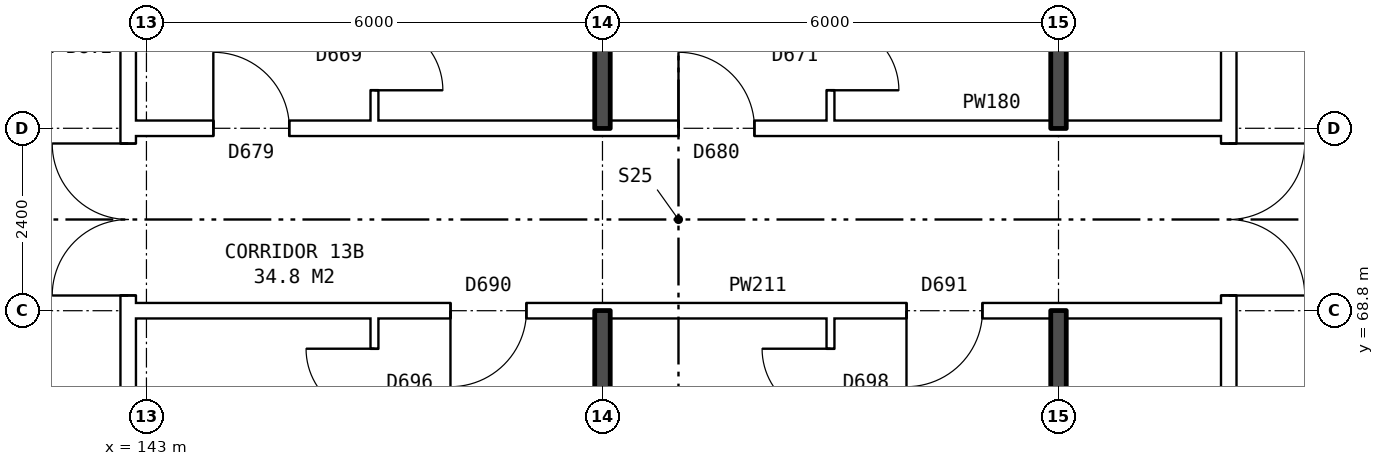
"""IFC4 building model, lengths in metres.
Left out: names, types, materials, properties, quantities, classifications, styles, units other than length and angle.
Written with IfcOpenShell. Run it as: python <this file> out.ifc"""

import sys

from ifc_helpers import new_model, si_unit, direction, frame, frame_2d, origin, place, context, subcontext, project, spatial, rectangle, extrude, element, fill, save


model = new_model("IFC4")
c1 = context("Model", 3, precision=1e-05, world=origin(), true_north=direction((0.0, 1.0)))
c2 = subcontext(c1, "Body", "Model", "MODEL_VIEW")
j1 = project(units=[si_unit("LENGTHUNIT", "METRE"), si_unit("PLANEANGLEUNIT", "RADIAN")], contexts=[c1])
p1 = place(None, origin())
s1 = spatial("IfcSite", under=j1, at=p1, CompositionType="ELEMENT")
p2 = place(p1, origin())
s2 = spatial("IfcBuilding", under=s1, at=p2, CompositionType="ELEMENT")
p3 = place(p2, frame((0.0, 0.0, 50.5)))
s3 = spatial("IfcBuildingStorey", under=s2, at=p3, CompositionType="ELEMENT", Elevation=50.5)
p4 = place(p3, frame((142.76, 63.9, 0.0), z_axis=(0.0, 0.0, 1.0), x_axis=(0.0, 1.0, 0.0)))
e1 = element("IfcWall", 1, at=p4, inside=s3, PredefinedType="PARTITIONING", context=c2, shape_type="SweptSolid", body=[
    extrude(rectangle(XDim=12.2, YDim=0.2, at=frame_2d((6.1, 0.0))), origin(), (0.0, 0.0, 1.0), 2.85),
])
p5 = place(p4, frame((5.1, 0.0, 0.0)))
e2 = element("IfcOpeningElement", 2, at=p5, cuts=e1, PredefinedType="OPENING", context=c2, shape_type="SweptSolid", body=[
    extrude(rectangle(XDim=2.0, YDim=2.1, at=frame_2d((1.0, 1.05))), frame((0.0, 0.11, 0.0), z_axis=(0.0, -1.0, 0.0), x_axis=(1.0, 0.0, 0.0)), (0.0, 0.0, 1.0), 0.22),
])
p6 = place(p3, frame((157.24, 63.9, 0.0), z_axis=(0.0, 0.0, 1.0), x_axis=(0.0, 1.0, 0.0)))
e3 = element("IfcWall", 3, at=p6, inside=s3, PredefinedType="PARTITIONING", context=c2, shape_type="SweptSolid", body=[
    extrude(rectangle(XDim=12.2, YDim=0.2, at=frame_2d((6.1, 0.0))), origin(), (0.0, 0.0, 1.0), 2.85),
])
p7 = place(p6, frame((5.1, 0.0, 0.0)))
e4 = element("IfcOpeningElement", 4, at=p7, cuts=e3, PredefinedType="OPENING", context=c2, shape_type="SweptSolid", body=[
    extrude(rectangle(XDim=2.0, YDim=2.1, at=frame_2d((1.0, 1.05))), frame((0.0, 0.11, 0.0), z_axis=(0.0, -1.0, 0.0), x_axis=(1.0, 0.0, 0.0)), (0.0, 0.0, 1.0), 0.22),
])
p8 = place(p3, frame((142.76, 68.8, 0.0), z_axis=(0.0, 0.0, 1.0), x_axis=(1.0, 0.0, 0.0)))
e5 = element("IfcWall", 5, at=p8, inside=s3, PredefinedType="PARTITIONING", context=c2, shape_type="SweptSolid", body=[
    extrude(rectangle(XDim=14.48, YDim=0.2, at=frame_2d((7.24, 0.0))), origin(), (0.0, 0.0, 1.0), 2.85),
])
p9 = place(p8, frame((4.24, 0.0, 0.0)))
e6 = element("IfcOpeningElement", 6, at=p9, cuts=e5, PredefinedType="OPENING", context=c2, shape_type="SweptSolid", body=[
    extrude(rectangle(XDim=1.0, YDim=2.1, at=frame_2d((0.5, 1.05))), frame((0.0, 0.11, 0.0), z_axis=(0.0, -1.0, 0.0), x_axis=(1.0, 0.0, 0.0)), (0.0, 0.0, 1.0), 0.22),
])
p10 = place(p8, frame((10.24, 0.0, 0.0)))
e7 = element("IfcOpeningElement", 7, at=p10, cuts=e5, PredefinedType="OPENING", context=c2, shape_type="SweptSolid", body=[
    extrude(rectangle(XDim=1.0, YDim=2.1, at=frame_2d((0.5, 1.05))), frame((0.0, 0.11, 0.0), z_axis=(0.0, -1.0, 0.0), x_axis=(1.0, 0.0, 0.0)), (0.0, 0.0, 1.0), 0.22),
])
p11 = place(p3, frame((142.76, 71.2, 0.0), z_axis=(0.0, 0.0, 1.0), x_axis=(1.0, 0.0, 0.0)))
e8 = element("IfcWall", 8, at=p11, inside=s3, PredefinedType="PARTITIONING", context=c2, shape_type="SweptSolid", body=[
    extrude(rectangle(XDim=14.48, YDim=0.2, at=frame_2d((7.24, 0.0))), origin(), (0.0, 0.0, 1.0), 2.85),
])
p12 = place(p11, frame((1.12, 0.0, 0.0)))
e9 = element("IfcOpeningElement", 9, at=p12, cuts=e8, PredefinedType="OPENING", context=c2, shape_type="SweptSolid", body=[
    extrude(rectangle(XDim=1.0, YDim=2.1, at=frame_2d((0.5, 1.05))), frame((0.0, 0.11, 0.0), z_axis=(0.0, -1.0, 0.0), x_axis=(1.0, 0.0, 0.0)), (0.0, 0.0, 1.0), 0.22),
])
p13 = place(p11, frame((7.24, 0.0, 0.0)))
e10 = element("IfcOpeningElement", 10, at=p13, cuts=e8, PredefinedType="OPENING", context=c2, shape_type="SweptSolid", body=[
    extrude(rectangle(XDim=1.0, YDim=2.1, at=frame_2d((0.5, 1.05))), frame((0.0, 0.11, 0.0), z_axis=(0.0, -1.0, 0.0), x_axis=(1.0, 0.0, 0.0)), (0.0, 0.0, 1.0), 0.22),
])
p14 = place(p3, frame((146.0, 54.36, 0.0), z_axis=(0.0, 0.0, 1.0), x_axis=(0.0, 1.0, 0.0)))
e11 = element("IfcWall", 11, at=p14, inside=s3, PredefinedType="PARTITIONING", context=c2, shape_type="SweptSolid", body=[
    extrude(rectangle(XDim=14.34, YDim=0.1, at=frame_2d((7.17, 0.0))), origin(), (0.0, 0.0, 1.0), 2.85),
])
p15 = place(p14, frame((5.5, 0.0, 0.0)))
e12 = element("IfcOpeningElement", 12, at=p15, cuts=e11, PredefinedType="OPENING", context=c2, shape_type="SweptSolid", body=[
    extrude(rectangle(XDim=0.9, YDim=2.1, at=frame_2d((0.45, 1.05))), frame((0.0, 0.06, 0.0), z_axis=(0.0, -1.0, 0.0), x_axis=(1.0, 0.0, 0.0)), (0.0, 0.0, 1.0), 0.12),
])
p16 = place(p14, frame((13.04, 0.0, 0.0)))
e13 = element("IfcOpeningElement", 13, at=p16, cuts=e11, PredefinedType="OPENING", context=c2, shape_type="SweptSolid", body=[
    extrude(rectangle(XDim=0.9, YDim=2.1, at=frame_2d((0.45, 1.05))), frame((0.0, 0.06, 0.0), z_axis=(0.0, -1.0, 0.0), x_axis=(1.0, 0.0, 0.0)), (0.0, 0.0, 1.0), 0.12),
])
p17 = place(p3, frame((146.0, 71.3, 0.0), z_axis=(0.0, 0.0, 1.0), x_axis=(0.0, 1.0, 0.0)))
e14 = element("IfcWall", 14, at=p17, inside=s3, PredefinedType="PARTITIONING", context=c2, shape_type="SweptSolid", body=[
    extrude(rectangle(XDim=14.34, YDim=0.1, at=frame_2d((7.17, 0.0))), origin(), (0.0, 0.0, 1.0), 2.85),
])
p18 = place(p17, frame((7.94, 0.0, 0.0)))
e15 = element("IfcOpeningElement", 15, at=p18, cuts=e14, PredefinedType="OPENING", context=c2, shape_type="SweptSolid", body=[
    extrude(rectangle(XDim=0.9, YDim=2.1, at=frame_2d((0.45, 1.05))), frame((0.0, 0.06, 0.0), z_axis=(0.0, -1.0, 0.0), x_axis=(1.0, 0.0, 0.0)), (0.0, 0.0, 1.0), 0.12),
])
p19 = place(p17, frame((0.4, 0.0, 0.0)))
e16 = element("IfcOpeningElement", 16, at=p19, cuts=e14, PredefinedType="OPENING", context=c2, shape_type="SweptSolid", body=[
    extrude(rectangle(XDim=0.9, YDim=2.1, at=frame_2d((0.45, 1.05))), frame((0.0, 0.06, 0.0), z_axis=(0.0, -1.0, 0.0), x_axis=(1.0, 0.0, 0.0)), (0.0, 0.0, 1.0), 0.12),
])
for number, where, z_axis, x_axis in (
    (17, (149.0, 54.36, 0.0), (0.0, 0.0, 1.0), (0.0, 1.0, 0.0)),
    (18, (149.0, 71.2, 0.0), (0.0, 0.0, 1.0), (0.0, 1.0, 0.0)),
):
    element("IfcWall", number, at=place(p3, frame(where, z_axis=z_axis, x_axis=x_axis)), inside=s3, PredefinedType="SOLIDWALL", context=c2, shape_type="SweptSolid", body=[
        extrude(rectangle(XDim=14.44, YDim=0.2, at=frame_2d((7.22, 0.0))), origin(), (0.0, 0.0, 1.0), 2.85),
    ])
p20 = place(p3, frame((152.0, 54.36, 0.0), z_axis=(0.0, 0.0, 1.0), x_axis=(0.0, 1.0, 0.0)))
e19 = element("IfcWall", 19, at=p20, inside=s3, PredefinedType="PARTITIONING", context=c2, shape_type="SweptSolid", body=[
    extrude(rectangle(XDim=14.34, YDim=0.1, at=frame_2d((7.17, 0.0))), origin(), (0.0, 0.0, 1.0), 2.85),
])
p21 = place(p20, frame((4.2, 0.0, 0.0)))
e20 = element("IfcOpeningElement", 20, at=p21, cuts=e19, PredefinedType="OPENING", context=c2, shape_type="SweptSolid", body=[
    extrude(rectangle(XDim=0.9, YDim=2.1, at=frame_2d((0.45, 1.05))), frame((0.0, 0.06, 0.0), z_axis=(0.0, -1.0, 0.0), x_axis=(1.0, 0.0, 0.0)), (0.0, 0.0, 1.0), 0.12),
])
p22 = place(p20, frame((13.04, 0.0, 0.0)))
e21 = element("IfcOpeningElement", 21, at=p22, cuts=e19, PredefinedType="OPENING", context=c2, shape_type="SweptSolid", body=[
    extrude(rectangle(XDim=0.9, YDim=2.1, at=frame_2d((0.45, 1.05))), frame((0.0, 0.06, 0.0), z_axis=(0.0, -1.0, 0.0), x_axis=(1.0, 0.0, 0.0)), (0.0, 0.0, 1.0), 0.12),
])
p23 = place(p3, frame((152.0, 71.3, 0.0), z_axis=(0.0, 0.0, 1.0), x_axis=(0.0, 1.0, 0.0)))
e22 = element("IfcWall", 22, at=p23, inside=s3, PredefinedType="PARTITIONING", context=c2, shape_type="SweptSolid", body=[
    extrude(rectangle(XDim=14.34, YDim=0.1, at=frame_2d((7.17, 0.0))), origin(), (0.0, 0.0, 1.0), 2.85),
])
p24 = place(p23, frame((5.74, 0.0, 0.0)))
e23 = element("IfcOpeningElement", 23, at=p24, cuts=e22, PredefinedType="OPENING", context=c2, shape_type="SweptSolid", body=[
    extrude(rectangle(XDim=0.9, YDim=2.1, at=frame_2d((0.45, 1.05))), frame((0.0, 0.06, 0.0), z_axis=(0.0, -1.0, 0.0), x_axis=(1.0, 0.0, 0.0)), (0.0, 0.0, 1.0), 0.12),
])
p25 = place(p23, frame((0.4, 0.0, 0.0)))
e24 = element("IfcOpeningElement", 24, at=p25, cuts=e22, PredefinedType="OPENING", context=c2, shape_type="SweptSolid", body=[
    extrude(rectangle(XDim=0.9, YDim=2.1, at=frame_2d((0.45, 1.05))), frame((0.0, 0.06, 0.0), z_axis=(0.0, -1.0, 0.0), x_axis=(1.0, 0.0, 0.0)), (0.0, 0.0, 1.0), 0.12),
])
for number, where, z_axis, x_axis in (
    (25, (155.0, 63.8, 0.0), (0.0, 0.0, 1.0), (0.0, 1.0, 0.0)),
    (26, (155.0, 71.2, 0.0), (0.0, 0.0, 1.0), (0.0, 1.0, 0.0)),
):
    element("IfcWall", number, at=place(p3, frame(where, z_axis=z_axis, x_axis=x_axis)), inside=s3, PredefinedType="SOLIDWALL", context=c2, shape_type="SweptSolid", body=[
        extrude(rectangle(XDim=5.0, YDim=0.2, at=frame_2d((2.5, 0.0))), origin(), (0.0, 0.0, 1.0), 2.85),
    ])
p26 = place(p5, origin())
e27 = element("IfcDoor", 27, at=p26, inside=s3, OperationType="DOUBLE_DOOR_SINGLE_SWING", PredefinedType="DOOR", context=c2, shape_type="SweptSolid", body=[
    extrude(rectangle(XDim=2.0, YDim=2.1, at=frame_2d((1.0, 1.05))), frame((0.0, 0.025, 0.0), z_axis=(0.0, -1.0, 0.0), x_axis=(1.0, 0.0, 0.0)), (0.0, 0.0, 1.0), 0.05),
])
fill(e2, e27)
p27 = place(p7, frame((2.0, 0.0, 0.0), z_axis=(0.0, 0.0, 1.0), x_axis=(-1.0, 0.0, 0.0)))
e28 = element("IfcDoor", 28, at=p27, inside=s3, OperationType="DOUBLE_DOOR_SINGLE_SWING", PredefinedType="DOOR", context=c2, shape_type="SweptSolid", body=[
    extrude(rectangle(XDim=2.0, YDim=2.1, at=frame_2d((1.0, 1.05))), frame((0.0, 0.025, 0.0), z_axis=(0.0, -1.0, 0.0), x_axis=(1.0, 0.0, 0.0)), (0.0, 0.0, 1.0), 0.05),
])
fill(e4, e28)
p28 = place(p9, frame((1.0, 0.0, 0.0), z_axis=(0.0, 0.0, 1.0), x_axis=(-1.0, 0.0, 0.0)))
e29 = element("IfcDoor", 29, at=p28, inside=s3, OperationType="SINGLE_SWING_RIGHT", PredefinedType="DOOR", context=c2, shape_type="SweptSolid", body=[
    extrude(rectangle(XDim=1.0, YDim=2.1, at=frame_2d((0.5, 1.05))), frame((0.0, 0.025, 0.0), z_axis=(0.0, -1.0, 0.0), x_axis=(1.0, 0.0, 0.0)), (0.0, 0.0, 1.0), 0.05),
])
fill(e6, e29)
p29 = place(p16, origin())
e30 = element("IfcDoor", 30, at=p29, inside=s3, OperationType="SINGLE_SWING_RIGHT", PredefinedType="DOOR", context=c2, shape_type="SweptSolid", body=[
    extrude(rectangle(XDim=0.9, YDim=2.1, at=frame_2d((0.45, 1.05))), frame((0.0, 0.025, 0.0), z_axis=(0.0, -1.0, 0.0), x_axis=(1.0, 0.0, 0.0)), (0.0, 0.0, 1.0), 0.05),
])
fill(e13, e30)
p30 = place(p10, frame((1.0, 0.0, 0.0), z_axis=(0.0, 0.0, 1.0), x_axis=(-1.0, 0.0, 0.0)))
e31 = element("IfcDoor", 31, at=p30, inside=s3, OperationType="SINGLE_SWING_RIGHT", PredefinedType="DOOR", context=c2, shape_type="SweptSolid", body=[
    extrude(rectangle(XDim=1.0, YDim=2.1, at=frame_2d((0.5, 1.05))), frame((0.0, 0.025, 0.0), z_axis=(0.0, -1.0, 0.0), x_axis=(1.0, 0.0, 0.0)), (0.0, 0.0, 1.0), 0.05),
])
fill(e7, e31)
p31 = place(p22, origin())
e32 = element("IfcDoor", 32, at=p31, inside=s3, OperationType="SINGLE_SWING_RIGHT", PredefinedType="DOOR", context=c2, shape_type="SweptSolid", body=[
    extrude(rectangle(XDim=0.9, YDim=2.1, at=frame_2d((0.45, 1.05))), frame((0.0, 0.025, 0.0), z_axis=(0.0, -1.0, 0.0), x_axis=(1.0, 0.0, 0.0)), (0.0, 0.0, 1.0), 0.05),
])
fill(e21, e32)
p32 = place(p12, origin())
e33 = element("IfcDoor", 33, at=p32, inside=s3, OperationType="SINGLE_SWING_LEFT", PredefinedType="DOOR", context=c2, shape_type="SweptSolid", body=[
    extrude(rectangle(XDim=1.0, YDim=2.1, at=frame_2d((0.5, 1.05))), frame((0.0, 0.025, 0.0), z_axis=(0.0, -1.0, 0.0), x_axis=(1.0, 0.0, 0.0)), (0.0, 0.0, 1.0), 0.05),
])
fill(e9, e33)
p33 = place(p19, frame((0.9, 0.0, 0.0), z_axis=(0.0, 0.0, 1.0), x_axis=(-1.0, 0.0, 0.0)))
e34 = element("IfcDoor", 34, at=p33, inside=s3, OperationType="SINGLE_SWING_RIGHT", PredefinedType="DOOR", context=c2, shape_type="SweptSolid", body=[
    extrude(rectangle(XDim=0.9, YDim=2.1, at=frame_2d((0.45, 1.05))), frame((0.0, 0.025, 0.0), z_axis=(0.0, -1.0, 0.0), x_axis=(1.0, 0.0, 0.0)), (0.0, 0.0, 1.0), 0.05),
])
fill(e16, e34)
p34 = place(p13, origin())
e35 = element("IfcDoor", 35, at=p34, inside=s3, OperationType="SINGLE_SWING_LEFT", PredefinedType="DOOR", context=c2, shape_type="SweptSolid", body=[
    extrude(rectangle(XDim=1.0, YDim=2.1, at=frame_2d((0.5, 1.05))), frame((0.0, 0.025, 0.0), z_axis=(0.0, -1.0, 0.0), x_axis=(1.0, 0.0, 0.0)), (0.0, 0.0, 1.0), 0.05),
])
fill(e10, e35)
p35 = place(p25, frame((0.9, 0.0, 0.0), z_axis=(0.0, 0.0, 1.0), x_axis=(-1.0, 0.0, 0.0)))
e36 = element("IfcDoor", 36, at=p35, inside=s3, OperationType="SINGLE_SWING_RIGHT", PredefinedType="DOOR", context=c2, shape_type="SweptSolid", body=[
    extrude(rectangle(XDim=0.9, YDim=2.1, at=frame_2d((0.45, 1.05))), frame((0.0, 0.025, 0.0), z_axis=(0.0, -1.0, 0.0), x_axis=(1.0, 0.0, 0.0)), (0.0, 0.0, 1.0), 0.05),
])
fill(e24, e36)
save(model, sys.argv[1])
